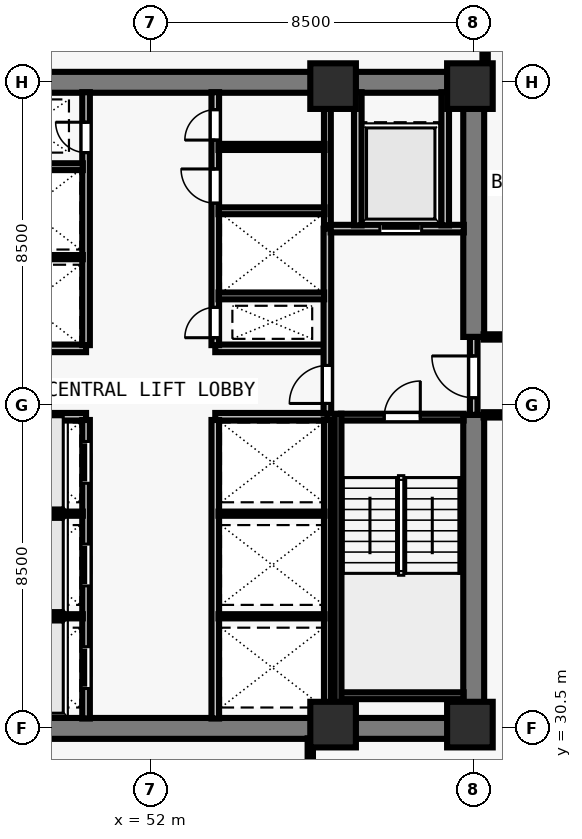
"""IFC4 building model, lengths in metres.
Left out: names, types, materials, properties, quantities, classifications, styles, units other than length and angle.
Written with IfcOpenShell. Run it as: python <this file> out.ifc"""

import sys

from ifc_helpers import new_model, si_unit, direction, frame, frame_2d, origin, origin_2d, place, context, subcontext, project, spatial, rectangle, extrude, element, fill, save


model = new_model("IFC4")
c1 = context("Model", 3, precision=1e-05, world=origin(), true_north=direction((0.0, 1.0)))
c2 = subcontext(c1, "Body", "Model", "MODEL_VIEW")
j1 = project(units=[si_unit("LENGTHUNIT", "METRE"), si_unit("PLANEANGLEUNIT", "RADIAN")], contexts=[c1])
p1 = place(None, origin())
s1 = spatial("IfcSite", under=j1, at=p1, CompositionType="ELEMENT")
p2 = place(p1, origin())
s2 = spatial("IfcBuilding", under=s1, at=p2, CompositionType="ELEMENT")
p3 = place(p2, frame((0.0, 0.0, 65.5)))
s3 = spatial("IfcBuildingStorey", under=s2, at=p3, CompositionType="ELEMENT", Elevation=65.5)
for number, where, z_axis, x_axis in (
    (1, (56.8, 30.6, 0.0), (0.0, 0.0, 1.0), (1.0, 0.0, 0.0)),
    (2, (60.4, 30.6, 0.0), (0.0, 0.0, 1.0), (1.0, 0.0, 0.0)),
    (3, (56.8, 47.4, 0.0), (0.0, 0.0, 1.0), (1.0, 0.0, 0.0)),
    (4, (60.4, 47.4, 0.0), (0.0, 0.0, 1.0), (1.0, 0.0, 0.0)),
):
    element("IfcColumn", number, at=place(p3, frame(where, z_axis=z_axis, x_axis=x_axis)), inside=s3, PredefinedType="COLUMN", context=c2, shape_type="SweptSolid", body=[
        extrude(rectangle(XDim=1.2, YDim=1.2, at=origin_2d()), origin(), (0.0, 0.0, 1.0), 3.5),
    ])
for number, where, z_axis, x_axis in (
    (5, (43.225, 30.5, 0.0), (0.0, 0.0, 1.0), (1.0, 0.0, 0.0)),
    (6, (43.225, 47.5, 0.0), (0.0, 0.0, 1.0), (1.0, 0.0, 0.0)),
):
    element("IfcWall", number, at=place(p3, frame(where, z_axis=z_axis, x_axis=x_axis)), inside=s3, PredefinedType="SHEAR", context=c2, shape_type="SweptSolid", body=[
        extrude(rectangle(XDim=17.55, YDim=0.55, at=frame_2d((8.775, 0.0))), origin(), (0.0, 0.0, 1.0), 3.28),
    ])
p4 = place(p3, frame((60.5, 30.765, 0.0), z_axis=(0.0, 0.0, 1.0), x_axis=(0.0, 1.0, 0.0)))
e7 = element("IfcWall", 7, at=p4, inside=s3, PredefinedType="SHEAR", context=c2, shape_type="SweptSolid", body=[
    extrude(rectangle(XDim=7.985, YDim=0.55, at=frame_2d((3.993, 0.0))), origin(), (0.0, 0.0, 1.0), 3.28),
])
p5 = place(p3, frame((60.5, 40.8, 0.0), z_axis=(0.0, 0.0, 1.0), x_axis=(0.0, 1.0, 0.0)))
e8 = element("IfcWall", 8, at=p5, inside=s3, PredefinedType="SHEAR", context=c2, shape_type="SweptSolid", body=[
    extrude(rectangle(XDim=6.435, YDim=0.55, at=frame_2d((3.218, 0.0))), origin(), (0.0, 0.0, 1.0), 3.28),
])
for number, where, z_axis, x_axis in (
    (9, (47.35, 38.7, 0.0), (0.0, 0.0, 1.0), (1.0, 0.0, 0.0)),
    (10, (47.35, 40.5, 0.0), (0.0, 0.0, 1.0), (1.0, 0.0, 0.0)),
    (11, (53.7, 38.7, 0.0), (0.0, 0.0, 1.0), (1.0, 0.0, 0.0)),
    (12, (53.7, 40.5, 0.0), (0.0, 0.0, 1.0), (1.0, 0.0, 0.0)),
):
    element("IfcWall", number, at=place(p3, frame(where, z_axis=z_axis, x_axis=x_axis)), inside=s3, PredefinedType="SOLIDWALL", context=c2, shape_type="SweptSolid", body=[
        extrude(rectangle(XDim=2.95, YDim=0.2, at=frame_2d((1.475, 0.0))), origin(), (0.0, 0.0, 1.0), 3.28),
    ])
p6 = place(p3, frame((50.3, 30.76, 0.0), z_axis=(0.0, 0.0, 1.0), x_axis=(0.0, 1.0, 0.0)))
e13 = element("IfcWall", 13, at=p6, inside=s3, PredefinedType="SOLIDWALL", context=c2, shape_type="SweptSolid", body=[
    extrude(rectangle(XDim=7.855, YDim=0.2, at=frame_2d((3.927, 0.0))), origin(), (0.0, 0.0, 1.0), 3.28),
])
p7 = place(p6, frame((0.79, 0.0, 0.0)))
e14 = element("IfcOpeningElement", 14, at=p7, cuts=e13, PredefinedType="OPENING", context=c2, shape_type="SweptSolid", body=[
    extrude(rectangle(XDim=1.1, YDim=2.2, at=frame_2d((0.55, 1.1))), frame((0.0, 0.11, 0.0), z_axis=(0.0, -1.0, 0.0), x_axis=(1.0, 0.0, 0.0)), (0.0, 0.0, 1.0), 0.22),
])
p8 = place(p6, frame((3.49, 0.0, 0.0)))
e15 = element("IfcOpeningElement", 15, at=p8, cuts=e13, PredefinedType="OPENING", context=c2, shape_type="SweptSolid", body=[
    extrude(rectangle(XDim=1.1, YDim=2.2, at=frame_2d((0.55, 1.1))), frame((0.0, 0.11, 0.0), z_axis=(0.0, -1.0, 0.0), x_axis=(1.0, 0.0, 0.0)), (0.0, 0.0, 1.0), 0.22),
])
p9 = place(p6, frame((6.19, 0.0, 0.0)))
e16 = element("IfcOpeningElement", 16, at=p9, cuts=e13, PredefinedType="OPENING", context=c2, shape_type="SweptSolid", body=[
    extrude(rectangle(XDim=1.1, YDim=2.2, at=frame_2d((0.55, 1.1))), frame((0.0, 0.11, 0.0), z_axis=(0.0, -1.0, 0.0), x_axis=(1.0, 0.0, 0.0)), (0.0, 0.0, 1.0), 0.22),
])
p10 = place(p3, frame((53.7, 30.76, 0.0), z_axis=(0.0, 0.0, 1.0), x_axis=(0.0, 1.0, 0.0)))
e17 = element("IfcWall", 17, at=p10, inside=s3, PredefinedType="SOLIDWALL", context=c2, shape_type="SweptSolid", body=[
    extrude(rectangle(XDim=7.855, YDim=0.2, at=frame_2d((3.927, 0.0))), origin(), (0.0, 0.0, 1.0), 3.28),
])
p11 = place(p3, frame((50.3, 40.585, 0.0), z_axis=(0.0, 0.0, 1.0), x_axis=(0.0, 1.0, 0.0)))
e18 = element("IfcWall", 18, at=p11, inside=s3, PredefinedType="SOLIDWALL", context=c2, shape_type="SweptSolid", body=[
    extrude(rectangle(XDim=6.655, YDim=0.2, at=frame_2d((3.328, 0.0))), origin(), (0.0, 0.0, 1.0), 3.28),
])
p12 = place(p11, frame((5.065, 0.0, 0.0)))
e19 = element("IfcOpeningElement", 19, at=p12, cuts=e18, PredefinedType="OPENING", context=c2, shape_type="SweptSolid", body=[
    extrude(rectangle(XDim=0.8, YDim=2.08, at=frame_2d((0.4, 1.04))), frame((0.0, 0.11, 0.0), z_axis=(0.0, -1.0, 0.0), x_axis=(1.0, 0.0, 0.0)), (0.0, 0.0, 1.0), 0.22),
])
p13 = place(p3, frame((53.7, 40.585, 0.0), z_axis=(0.0, 0.0, 1.0), x_axis=(0.0, 1.0, 0.0)))
e20 = element("IfcWall", 20, at=p13, inside=s3, PredefinedType="SOLIDWALL", context=c2, shape_type="SweptSolid", body=[
    extrude(rectangle(XDim=6.655, YDim=0.2, at=frame_2d((3.328, 0.0))), origin(), (0.0, 0.0, 1.0), 3.28),
])
p14 = place(p13, frame((0.195, 0.0, 0.0)))
e21 = element("IfcOpeningElement", 21, at=p14, cuts=e20, PredefinedType="OPENING", context=c2, shape_type="SweptSolid", body=[
    extrude(rectangle(XDim=0.8, YDim=2.08, at=frame_2d((0.4, 1.04))), frame((0.0, 0.11, 0.0), z_axis=(0.0, -1.0, 0.0), x_axis=(1.0, 0.0, 0.0)), (0.0, 0.0, 1.0), 0.22),
])
p15 = place(p13, frame((3.735, 0.0, 0.0)))
e22 = element("IfcOpeningElement", 22, at=p15, cuts=e20, PredefinedType="OPENING", context=c2, shape_type="SweptSolid", body=[
    extrude(rectangle(XDim=0.9, YDim=2.12, at=frame_2d((0.45, 1.06))), frame((0.0, 0.11, 0.0), z_axis=(0.0, -1.0, 0.0), x_axis=(1.0, 0.0, 0.0)), (0.0, 0.0, 1.0), 0.22),
])
p16 = place(p13, frame((5.395, 0.0, 0.0)))
e23 = element("IfcOpeningElement", 23, at=p16, cuts=e20, PredefinedType="OPENING", context=c2, shape_type="SweptSolid", body=[
    extrude(rectangle(XDim=0.8, YDim=2.1, at=frame_2d((0.4, 1.05))), frame((0.0, 0.11, 0.0), z_axis=(0.0, -1.0, 0.0), x_axis=(1.0, 0.0, 0.0)), (0.0, 0.0, 1.0), 0.22),
])
p17 = place(p3, frame((60.5, 38.75, 0.0), z_axis=(0.0, 0.0, 1.0), x_axis=(0.0, 1.0, 0.0)))
e24 = element("IfcWall", 24, at=p17, inside=s3, PredefinedType="SOLIDWALL", context=c2, shape_type="SweptSolid", body=[
    extrude(rectangle(XDim=2.05, YDim=0.2, at=frame_2d((1.025, 0.0))), origin(), (0.0, 0.0, 1.0), 3.28),
])
p18 = place(p17, frame((0.45, 0.0, 0.0)))
e25 = element("IfcOpeningElement", 25, at=p18, cuts=e24, PredefinedType="OPENING", context=c2, shape_type="SweptSolid", body=[
    extrude(rectangle(XDim=1.1, YDim=2.15, at=frame_2d((0.55, 1.075))), frame((0.0, 0.11, 0.0), z_axis=(0.0, -1.0, 0.0), x_axis=(1.0, 0.0, 0.0)), (0.0, 0.0, 1.0), 0.22),
])
p19 = place(p3, frame((56.65, 38.785, 0.0), z_axis=(0.0, 0.0, 1.0), x_axis=(0.0, 1.0, 0.0)))
e26 = element("IfcWall", 26, at=p19, inside=s3, PredefinedType="SOLIDWALL", context=c2, shape_type="SweptSolid", body=[
    extrude(rectangle(XDim=4.865, YDim=0.2, at=frame_2d((2.433, 0.0))), origin(), (0.0, 0.0, 1.0), 3.28),
])
p20 = place(p19, frame((0.265, 0.0, 0.0)))
e27 = element("IfcOpeningElement", 27, at=p20, cuts=e26, PredefinedType="OPENING", context=c2, shape_type="SweptSolid", body=[
    extrude(rectangle(XDim=1.0, YDim=2.15, at=frame_2d((0.5, 1.075))), frame((0.0, 0.11, 0.0), z_axis=(0.0, -1.0, 0.0), x_axis=(1.0, 0.0, 0.0)), (0.0, 0.0, 1.0), 0.22),
])
p21 = place(p3, frame((56.735, 43.65, 0.0), z_axis=(0.0, 0.0, 1.0), x_axis=(1.0, 0.0, 0.0)))
e28 = element("IfcWall", 28, at=p21, inside=s3, PredefinedType="SOLIDWALL", context=c2, shape_type="SweptSolid", body=[
    extrude(rectangle(XDim=3.505, YDim=0.2, at=frame_2d((1.752, 0.0))), origin(), (0.0, 0.0, 1.0), 3.28),
])
p22 = place(p21, frame((1.295, 0.0, 0.0)))
e29 = element("IfcOpeningElement", 29, at=p22, cuts=e28, PredefinedType="OPENING", context=c2, shape_type="SweptSolid", body=[
    extrude(rectangle(XDim=1.1, YDim=2.2, at=frame_2d((0.55, 1.1))), frame((0.0, 0.11, 0.0), z_axis=(0.0, -1.0, 0.0), x_axis=(1.0, 0.0, 0.0)), (0.0, 0.0, 1.0), 0.22),
])
for number, where, z_axis, x_axis in (
    (30, (57.45, 43.735, 0.0), (0.0, 0.0, 1.0), (0.0, 1.0, 0.0)),
    (31, (59.75, 43.735, 0.0), (0.0, 0.0, 1.0), (0.0, 1.0, 0.0)),
):
    element("IfcWall", number, at=place(p3, frame(where, z_axis=z_axis, x_axis=x_axis)), inside=s3, PredefinedType="SOLIDWALL", context=c2, shape_type="SweptSolid", body=[
        extrude(rectangle(XDim=3.505, YDim=0.2, at=frame_2d((1.752, 0.0))), origin(), (0.0, 0.0, 1.0), 3.28),
    ])
for number, where, z_axis, x_axis in (
    (32, (47.425, 33.45, 0.0), (0.0, 0.0, 1.0), (1.0, 0.0, 0.0)),
    (33, (47.425, 36.15, 0.0), (0.0, 0.0, 1.0), (1.0, 0.0, 0.0)),
):
    element("IfcWall", number, at=place(p3, frame(where, z_axis=z_axis, x_axis=x_axis)), inside=s3, PredefinedType="PARTITIONING", context=c2, shape_type="SweptSolid", body=[
        extrude(rectangle(XDim=2.79, YDim=0.11, at=frame_2d((1.395, 0.0))), origin(), (0.0, 0.0, 1.0), 3.28),
    ])
p23 = place(p3, frame((56.65, 30.76, 0.0), z_axis=(0.0, 0.0, 1.0), x_axis=(0.0, 1.0, 0.0)))
e34 = element("IfcWall", 34, at=p23, inside=s3, PredefinedType="SOLIDWALL", context=c2, shape_type="SweptSolid", body=[
    extrude(rectangle(XDim=7.855, YDim=0.18, at=frame_2d((3.927, 0.0))), origin(), (0.0, 0.0, 1.0), 3.28),
])
for number, where, z_axis, x_axis in (
    (35, (53.785, 33.45, 0.0), (0.0, 0.0, 1.0), (1.0, 0.0, 0.0)),
    (36, (53.785, 36.15, 0.0), (0.0, 0.0, 1.0), (1.0, 0.0, 0.0)),
):
    element("IfcWall", number, at=place(p3, frame(where, z_axis=z_axis, x_axis=x_axis)), inside=s3, PredefinedType="PARTITIONING", context=c2, shape_type="SweptSolid", body=[
        extrude(rectangle(XDim=2.79, YDim=0.11, at=frame_2d((1.395, 0.0))), origin(), (0.0, 0.0, 1.0), 3.28),
    ])
p24 = place(p3, frame((47.435, 42.9, 0.0), z_axis=(0.0, 0.0, 1.0), x_axis=(1.0, 0.0, 0.0)))
e37 = element("IfcWall", 37, at=p24, inside=s3, PredefinedType="PARTITIONING", context=c2, shape_type="SweptSolid", body=[
    extrude(rectangle(XDim=2.78, YDim=0.11, at=frame_2d((1.39, 0.0))), origin(), (0.0, 0.0, 1.0), 3.28),
])
p25 = place(p3, frame((47.425, 45.28, 0.0), z_axis=(0.0, 0.0, 1.0), x_axis=(1.0, 0.0, 0.0)))
e38 = element("IfcWall", 38, at=p25, inside=s3, PredefinedType="SOLIDWALL", context=c2, shape_type="SweptSolid", body=[
    extrude(rectangle(XDim=2.79, YDim=0.18, at=frame_2d((1.395, 0.0))), origin(), (0.0, 0.0, 1.0), 3.28),
])
p26 = place(p3, frame((56.65, 43.735, 0.0), z_axis=(0.0, 0.0, 1.0), x_axis=(0.0, 1.0, 0.0)))
e39 = element("IfcWall", 39, at=p26, inside=s3, PredefinedType="SOLIDWALL", context=c2, shape_type="SweptSolid", body=[
    extrude(rectangle(XDim=3.505, YDim=0.18, at=frame_2d((1.752, 0.0))), origin(), (0.0, 0.0, 1.0), 3.28),
])
p27 = place(p3, frame((53.785, 41.88, 0.0), z_axis=(0.0, 0.0, 1.0), x_axis=(1.0, 0.0, 0.0)))
e40 = element("IfcWall", 40, at=p27, inside=s3, PredefinedType="SOLIDWALL", context=c2, shape_type="SweptSolid", body=[
    extrude(rectangle(XDim=2.78, YDim=0.18, at=frame_2d((1.39, 0.0))), origin(), (0.0, 0.0, 1.0), 3.28),
])
p28 = place(p3, frame((53.785, 44.12, 0.0), z_axis=(0.0, 0.0, 1.0), x_axis=(1.0, 0.0, 0.0)))
e41 = element("IfcWall", 41, at=p28, inside=s3, PredefinedType="SOLIDWALL", context=c2, shape_type="SweptSolid", body=[
    extrude(rectangle(XDim=2.79, YDim=0.18, at=frame_2d((1.395, 0.0))), origin(), (0.0, 0.0, 1.0), 3.28),
])
p29 = place(p3, frame((53.785, 45.8, 0.0), z_axis=(0.0, 0.0, 1.0), x_axis=(1.0, 0.0, 0.0)))
e42 = element("IfcWall", 42, at=p29, inside=s3, PredefinedType="PARTITIONING", context=c2, shape_type="SweptSolid", body=[
    extrude(rectangle(XDim=2.79, YDim=0.16, at=frame_2d((1.395, 0.0))), origin(), (0.0, 0.0, 1.0), 3.28),
])
for number, where, z_axis, x_axis in (
    (43, (60.76, 38.75, 0.0), (0.0, 0.0, 1.0), (1.0, 0.0, 0.0)),
    (44, (60.76, 40.8, 0.0), (0.0, 0.0, 1.0), (1.0, 0.0, 0.0)),
):
    element("IfcWall", number, at=place(p3, frame(where, z_axis=z_axis, x_axis=x_axis)), inside=s3, PredefinedType="PARTITIONING", context=c2, shape_type="SweptSolid", body=[
        extrude(rectangle(XDim=5.985, YDim=0.14, at=frame_2d((2.993, 0.0))), origin(), (0.0, 0.0, 1.0), 3.28),
    ])
p30 = place(p3, frame((56.2, 23.655, 0.0), z_axis=(0.0, 0.0, 1.0), x_axis=(0.0, 1.0, 0.0)))
e45 = element("IfcWall", 45, at=p30, inside=s3, PredefinedType="PARTITIONING", context=c2, shape_type="SweptSolid", body=[
    extrude(rectangle(XDim=6.585, YDim=0.14, at=frame_2d((3.292, 0.0))), origin(), (0.0, 0.0, 1.0), 2.849),
])
p31 = place(p3, frame((60.8, 47.76, 0.0), z_axis=(0.0, 0.0, 1.0), x_axis=(0.0, 1.0, 0.0)))
e46 = element("IfcWall", 46, at=p31, inside=s3, PredefinedType="PARTITIONING", context=c2, shape_type="SweptSolid", body=[
    extrude(rectangle(XDim=6.585, YDim=0.14, at=frame_2d((3.292, 0.0))), origin(), (0.0, 0.0, 1.0), 2.439),
])
p32 = place(p3, frame((57.005, 38.69, 0.0), z_axis=(0.0, 0.0, 1.0), x_axis=(1.0, 0.0, 0.0)))
e47 = element("IfcWall", 47, at=p32, inside=s3, PredefinedType="SOLIDWALL", context=c2, shape_type="SweptSolid", body=[
    extrude(rectangle(XDim=3.23, YDim=0.18, at=frame_2d((1.615, 0.0))), origin(), (0.0, 0.0, 1.0), 3.28),
])
p33 = place(p32, frame((1.14, 0.0, 0.0)))
e48 = element("IfcOpeningElement", 48, at=p33, cuts=e47, PredefinedType="OPENING", context=c2, shape_type="SweptSolid", body=[
    extrude(rectangle(XDim=0.95, YDim=2.15, at=frame_2d((0.475, 1.075))), frame((0.0, 0.1, 0.0), z_axis=(0.0, -1.0, 0.0), x_axis=(1.0, 0.0, 0.0)), (0.0, 0.0, 1.0), 0.2),
])
p34 = place(p3, frame((57.005, 31.36, 0.0), z_axis=(0.0, 0.0, 1.0), x_axis=(1.0, 0.0, 0.0)))
e49 = element("IfcWall", 49, at=p34, inside=s3, PredefinedType="SOLIDWALL", context=c2, shape_type="SweptSolid", body=[
    extrude(rectangle(XDim=3.23, YDim=0.18, at=frame_2d((1.615, 0.0))), origin(), (0.0, 0.0, 1.0), 3.28),
])
p35 = place(p3, frame((56.93, 38.78, 0.0), z_axis=(0.0, 0.0, 1.0), x_axis=(0.0, -1.0, 0.0)))
e50 = element("IfcWall", 50, at=p35, inside=s3, PredefinedType="SOLIDWALL", context=c2, shape_type="SweptSolid", body=[
    extrude(rectangle(XDim=8.017, YDim=0.18, at=frame_2d((4.009, 0.0))), origin(), (0.0, 0.0, 1.0), 3.28),
])
p36 = place(p18, origin())
e51 = element("IfcDoor", 51, at=p36, inside=s3, OperationType="SINGLE_SWING_RIGHT", PredefinedType="DOOR", context=c2, shape_type="SweptSolid", body=[
    extrude(rectangle(XDim=1.1, YDim=2.15, at=frame_2d((0.55, 1.075))), frame((0.0, 0.025, 0.0), z_axis=(0.0, -1.0, 0.0), x_axis=(1.0, 0.0, 0.0)), (0.0, 0.0, 1.0), 0.05),
])
fill(e25, e51)
p37 = place(p20, origin())
e52 = element("IfcDoor", 52, at=p37, inside=s3, OperationType="SINGLE_SWING_LEFT", PredefinedType="DOOR", context=c2, shape_type="SweptSolid", body=[
    extrude(rectangle(XDim=1.0, YDim=2.15, at=frame_2d((0.5, 1.075))), frame((0.0, 0.025, 0.0), z_axis=(0.0, -1.0, 0.0), x_axis=(1.0, 0.0, 0.0)), (0.0, 0.0, 1.0), 0.05),
])
fill(e27, e52)
p38 = place(p22, origin())
e53 = element("IfcDoor", 53, at=p38, inside=s3, OperationType="SLIDING_TO_LEFT", PredefinedType="DOOR", context=c2, shape_type="SweptSolid", body=[
    extrude(rectangle(XDim=1.1, YDim=2.2, at=frame_2d((0.55, 1.1))), frame((0.0, 0.025, 0.0), z_axis=(0.0, -1.0, 0.0), x_axis=(1.0, 0.0, 0.0)), (0.0, 0.0, 1.0), 0.05),
])
fill(e29, e53)
p39 = place(p7, origin())
e54 = element("IfcDoor", 54, at=p39, inside=s3, OperationType="SLIDING_TO_LEFT", PredefinedType="DOOR", context=c2, shape_type="SweptSolid", body=[
    extrude(rectangle(XDim=1.1, YDim=2.2, at=frame_2d((0.55, 1.1))), frame((0.0, 0.025, 0.0), z_axis=(0.0, -1.0, 0.0), x_axis=(1.0, 0.0, 0.0)), (0.0, 0.0, 1.0), 0.05),
])
fill(e14, e54)
p40 = place(p8, origin())
e55 = element("IfcDoor", 55, at=p40, inside=s3, OperationType="SLIDING_TO_LEFT", PredefinedType="DOOR", context=c2, shape_type="SweptSolid", body=[
    extrude(rectangle(XDim=1.1, YDim=2.2, at=frame_2d((0.55, 1.1))), frame((0.0, 0.025, 0.0), z_axis=(0.0, -1.0, 0.0), x_axis=(1.0, 0.0, 0.0)), (0.0, 0.0, 1.0), 0.05),
])
fill(e15, e55)
p41 = place(p9, origin())
e56 = element("IfcDoor", 56, at=p41, inside=s3, OperationType="SLIDING_TO_LEFT", PredefinedType="DOOR", context=c2, shape_type="SweptSolid", body=[
    extrude(rectangle(XDim=1.1, YDim=2.2, at=frame_2d((0.55, 1.1))), frame((0.0, 0.025, 0.0), z_axis=(0.0, -1.0, 0.0), x_axis=(1.0, 0.0, 0.0)), (0.0, 0.0, 1.0), 0.05),
])
fill(e16, e56)
p42 = place(p12, origin())
e57 = element("IfcDoor", 57, at=p42, inside=s3, OperationType="SINGLE_SWING_RIGHT", PredefinedType="DOOR", context=c2, shape_type="SweptSolid", body=[
    extrude(rectangle(XDim=0.8, YDim=2.08, at=frame_2d((0.4, 1.04))), frame((0.0, 0.025, 0.0), z_axis=(0.0, -1.0, 0.0), x_axis=(1.0, 0.0, 0.0)), (0.0, 0.0, 1.0), 0.05),
])
fill(e19, e57)
p43 = place(p14, origin())
e58 = element("IfcDoor", 58, at=p43, inside=s3, OperationType="SINGLE_SWING_LEFT", PredefinedType="DOOR", context=c2, shape_type="SweptSolid", body=[
    extrude(rectangle(XDim=0.8, YDim=2.08, at=frame_2d((0.4, 1.04))), frame((0.0, 0.025, 0.0), z_axis=(0.0, -1.0, 0.0), x_axis=(1.0, 0.0, 0.0)), (0.0, 0.0, 1.0), 0.05),
])
fill(e21, e58)
p44 = place(p15, origin())
e59 = element("IfcDoor", 59, at=p44, inside=s3, OperationType="SINGLE_SWING_RIGHT", PredefinedType="DOOR", context=c2, shape_type="SweptSolid", body=[
    extrude(rectangle(XDim=0.9, YDim=2.12, at=frame_2d((0.45, 1.06))), frame((0.0, 0.025, 0.0), z_axis=(0.0, -1.0, 0.0), x_axis=(1.0, 0.0, 0.0)), (0.0, 0.0, 1.0), 0.05),
])
fill(e22, e59)
p45 = place(p16, origin())
e60 = element("IfcDoor", 60, at=p45, inside=s3, OperationType="SINGLE_SWING_LEFT", PredefinedType="DOOR", context=c2, shape_type="SweptSolid", body=[
    extrude(rectangle(XDim=0.8, YDim=2.1, at=frame_2d((0.4, 1.05))), frame((0.0, 0.025, 0.0), z_axis=(0.0, -1.0, 0.0), x_axis=(1.0, 0.0, 0.0)), (0.0, 0.0, 1.0), 0.05),
])
fill(e23, e60)
p46 = place(p33, origin())
e61 = element("IfcDoor", 61, at=p46, inside=s3, OperationType="SINGLE_SWING_RIGHT", PredefinedType="DOOR", context=c2, shape_type="SweptSolid", body=[
    extrude(rectangle(XDim=0.95, YDim=2.15, at=frame_2d((0.475, 1.075))), frame((0.0, 0.025, 0.0), z_axis=(0.0, -1.0, 0.0), x_axis=(1.0, 0.0, 0.0)), (0.0, 0.0, 1.0), 0.05),
])
fill(e48, e61)
save(model, sys.argv[1])
